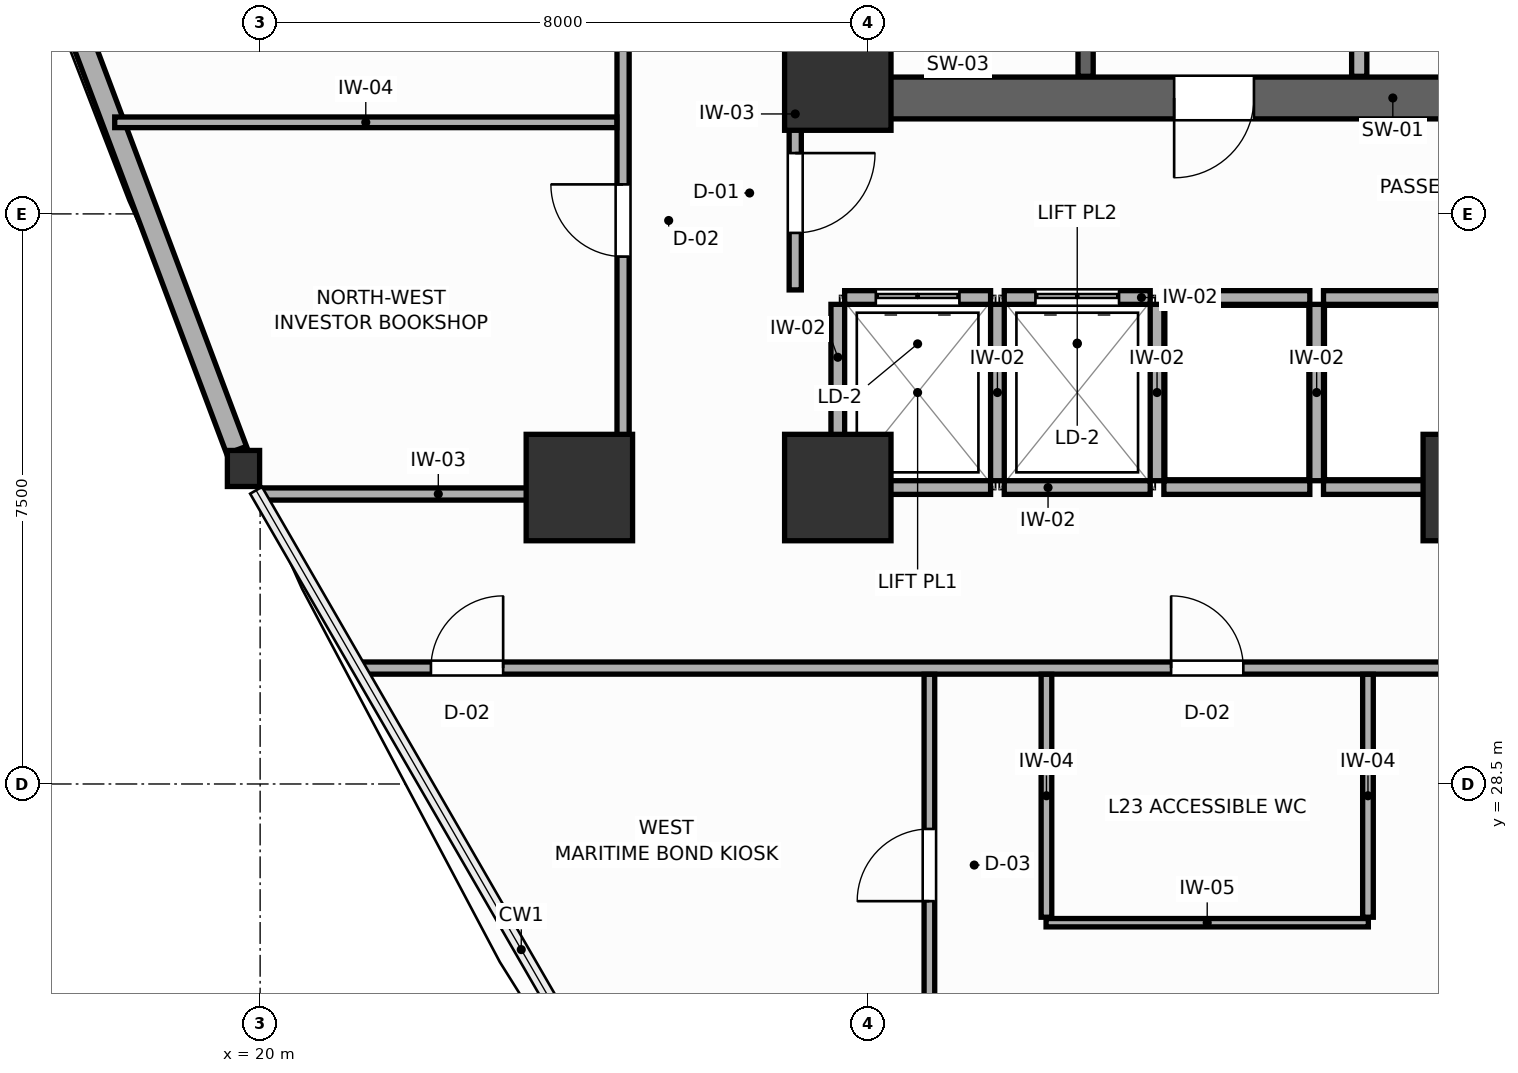
"""IFC4 building model, lengths in metres.
Left out: names, types, materials, properties, quantities, classifications, styles, units other than length and angle.
Written with IfcOpenShell. Run it as: python <this file> out.ifc"""

import sys

from ifc_helpers import new_model, si_unit, direction, frame, frame_2d, origin, origin_2d, place, context, subcontext, project, spatial, rectangle, i_section, extrude, source, transform, mapped, element, fill, save


model = new_model("IFC4")
c1 = context("Model", 3, precision=1e-05, world=origin(), true_north=direction((0.0, 1.0)))
c2 = subcontext(c1, "Body", "Model", "MODEL_VIEW")
j1 = project(units=[si_unit("LENGTHUNIT", "METRE"), si_unit("PLANEANGLEUNIT", "RADIAN")], contexts=[c1])
p1 = place(None, origin())
s1 = spatial("IfcSite", under=j1, at=p1, CompositionType="ELEMENT")
p2 = place(p1, origin())
s2 = spatial("IfcBuilding", under=s1, at=p2, CompositionType="ELEMENT")
p3 = place(p2, frame((0.0, 0.0, 95.1)))
s3 = spatial("IfcBuildingStorey", under=s2, at=p3, CompositionType="ELEMENT", Elevation=95.1)
p4 = place(p3, frame((27.05, 37.525, 0.0), z_axis=(0.0, 0.0, 1.0), x_axis=(1.0, 0.0, 0.0)))
e1 = element("IfcWall", 1, at=p4, inside=s3, PredefinedType="SHEAR", context=c2, shape_type="SweptSolid", body=[
    extrude(rectangle(XDim=17.9, YDim=0.55, at=frame_2d((8.95, 0.0))), origin(), (0.0, 0.0, 1.0), 3.9),
])
p5 = place(p4, frame((4.975, 0.0, 0.0)))
e2 = element("IfcOpeningElement", 2, at=p5, cuts=e1, PredefinedType="OPENING", context=c2, shape_type="SweptSolid", body=[
    extrude(rectangle(XDim=1.05, YDim=2.1, at=frame_2d((0.525, 1.05))), frame((0.0, 0.285, 0.0), z_axis=(0.0, -1.0, 0.0), x_axis=(1.0, 0.0, 0.0)), (0.0, 0.0, 1.0), 0.57),
])
p6 = place(p4, frame((11.875, 0.0, 0.0)))
e3 = element("IfcOpeningElement", 3, at=p6, cuts=e1, PredefinedType="OPENING", context=c2, shape_type="SweptSolid", body=[
    extrude(rectangle(XDim=1.05, YDim=2.1, at=frame_2d((0.525, 1.05))), frame((0.0, 0.285, 0.0), z_axis=(0.0, -1.0, 0.0), x_axis=(1.0, 0.0, 0.0)), (0.0, 0.0, 1.0), 0.57),
])
p7 = place(p3, frame((27.325, 37.8, 0.0), z_axis=(0.0, 0.0, 1.0), x_axis=(0.0, 1.0, 0.0)))
e4 = element("IfcWall", 4, at=p7, inside=s3, PredefinedType="SHEAR", context=c2, shape_type="SweptSolid", body=[
    extrude(rectangle(XDim=9.0, YDim=0.55, at=frame_2d((4.5, 0.0))), origin(), (0.0, 0.0, 1.0), 3.9),
])
m1 = source(origin(), c2, "Body", "SweptSolid", [
    extrude(rectangle(XDim=1.4, YDim=1.4, at=origin_2d()), origin(), (0.0, 0.0, 1.0), 3.9),
])
for number, where, z_axis, x_axis in (
    (5, (27.6, 37.8, 0.0), (0.0, 0.0, 1.0), (1.0, 0.0, 0.0)),
    (6, (27.6, 32.4, 0.0), (0.0, 0.0, 1.0), (1.0, 0.0, 0.0)),
    (7, (36.0, 32.4, 0.0), (0.0, 0.0, 1.0), (1.0, 0.0, 0.0)),
    (8, (24.2, 32.4, 0.0), (0.0, 0.0, 1.0), (1.0, 0.0, 0.0)),
):
    element("IfcColumn", number, at=place(p3, frame(where, z_axis=z_axis, x_axis=x_axis)), inside=s3, PredefinedType="COLUMN", context=c2, shape_type="MappedRepresentation", body=[
        mapped(m1, transform((0.0, 0.0, 0.0), scale=1.0)),
    ])
m2 = source(origin(), c2, "Body", "SweptSolid", [
    extrude(i_section(OverallWidth=0.424, OverallDepth=0.474, WebThickness=0.045, FlangeThickness=0.072, FilletRadius=0.015, at=origin_2d()), origin(), (0.0, 0.0, 1.0), 3.9),
])
p8 = place(p3, frame((19.781, 32.651, 0.0), z_axis=(0.0, 0.0, 1.0), x_axis=(1.0, 0.0, 0.0)))
e9 = element("IfcColumn", 9, at=p8, inside=s3, PredefinedType="COLUMN", context=c2, shape_type="MappedRepresentation", body=[
    mapped(m2, transform((0.0, 0.0, 0.0), scale=1.0)),
])
p9 = place(p3, frame((13.786, 48.577, 0.0), z_axis=(0.0, 0.0, 1.0), x_axis=(0.352279020809, -0.935895021622, 0.0)))
e10 = element("IfcWall", 10, at=p9, inside=s3, PredefinedType="SOLIDWALL", context=c2, shape_type="SweptSolid", body=[
    extrude(rectangle(XDim=16.759, YDim=0.28, at=frame_2d((8.379, 0.0))), origin(), (0.0, 0.0, 1.0), 2.07),
])
p10 = place(p9, frame((7.53, 0.0, 0.75)))
e11 = element("IfcOpeningElement", 11, at=p10, cuts=e10, PredefinedType="OPENING", context=c2, shape_type="SweptSolid", body=[
    extrude(rectangle(XDim=1.7, YDim=1.1, at=frame_2d((0.85, 0.55))), frame((0.0, 0.15, 0.0), z_axis=(0.0, -1.0, 0.0), x_axis=(1.0, 0.0, 0.0)), (0.0, 0.0, 1.0), 0.3),
])
p11 = place(p3, frame((30.86, 37.81, 0.0), z_axis=(0.0, 0.0, 1.0), x_axis=(0.0, 1.0, 0.0)))
e12 = element("IfcWall", 12, at=p11, inside=s3, PredefinedType="SHEAR", context=c2, shape_type="SweptSolid", body=[
    extrude(rectangle(XDim=8.98, YDim=0.2, at=frame_2d((4.49, 0.0))), origin(), (0.0, 0.0, 1.0), 3.9),
])
p12 = place(p11, frame((0.82, 0.0, 0.0)))
e13 = element("IfcOpeningElement", 13, at=p12, cuts=e12, PredefinedType="OPENING", context=c2, shape_type="SweptSolid", body=[
    extrude(rectangle(XDim=1.05, YDim=2.1, at=frame_2d((0.525, 1.05))), frame((0.0, 0.11, 0.0), z_axis=(0.0, -1.0, 0.0), x_axis=(1.0, 0.0, 0.0)), (0.0, 0.0, 1.0), 0.22),
])
p13 = place(p3, frame((34.46, 37.81, 0.0), z_axis=(0.0, 0.0, 1.0), x_axis=(0.0, 1.0, 0.0)))
e14 = element("IfcWall", 14, at=p13, inside=s3, PredefinedType="PARTITIONING", context=c2, shape_type="SweptSolid", body=[
    extrude(rectangle(XDim=8.98, YDim=0.2, at=frame_2d((4.49, 0.0))), origin(), (0.0, 0.0, 1.0), 3.7),
])
p14 = place(p13, frame((0.65, 0.0, 0.0)))
e15 = element("IfcOpeningElement", 15, at=p14, cuts=e14, PredefinedType="OPENING", context=c2, shape_type="SweptSolid", body=[
    extrude(rectangle(XDim=0.85, YDim=2.05, at=frame_2d((0.425, 1.025))), frame((0.0, 0.11, 0.0), z_axis=(0.0, -1.0, 0.0), x_axis=(1.0, 0.0, 0.0)), (0.0, 0.0, 1.0), 0.22),
])
p15 = place(p3, frame((27.69, 34.9, 0.0), z_axis=(0.0, 0.0, 1.0), x_axis=(1.0, 0.0, 0.0)))
e16 = element("IfcWall", 16, at=p15, inside=s3, PredefinedType="PARTITIONING", context=c2, shape_type="SweptSolid", body=[
    extrude(rectangle(XDim=1.92, YDim=0.18, at=frame_2d((0.96, 0.0))), origin(), (0.0, 0.0, 1.0), 3.7),
])
p16 = place(p15, frame((0.41, 0.0, 0.0)))
e17 = element("IfcOpeningElement", 17, at=p16, cuts=e16, PredefinedType="OPENING", context=c2, shape_type="SweptSolid", body=[
    extrude(rectangle(XDim=1.1, YDim=2.1, at=frame_2d((0.55, 1.05))), frame((0.0, 0.1, 0.0), z_axis=(0.0, -1.0, 0.0), x_axis=(1.0, 0.0, 0.0)), (0.0, 0.0, 1.0), 0.2),
])
p17 = place(p3, frame((27.69, 32.4, 0.0), z_axis=(0.0, 0.0, 1.0), x_axis=(1.0, 0.0, 0.0)))
e18 = element("IfcWall", 18, at=p17, inside=s3, PredefinedType="PARTITIONING", context=c2, shape_type="SweptSolid", body=[
    extrude(rectangle(XDim=1.92, YDim=0.18, at=frame_2d((0.96, 0.0))), origin(), (0.0, 0.0, 1.0), 2.23),
])
p18 = place(p3, frame((27.6, 32.49, 0.0), z_axis=(0.0, 0.0, 1.0), x_axis=(0.0, 1.0, 0.0)))
e19 = element("IfcWall", 19, at=p18, inside=s3, PredefinedType="PARTITIONING", context=c2, shape_type="SweptSolid", body=[
    extrude(rectangle(XDim=2.32, YDim=0.18, at=frame_2d((1.16, 0.0))), origin(), (0.0, 0.0, 1.0), 3.7),
])
p19 = place(p3, frame((29.79, 34.9, 0.0), z_axis=(0.0, 0.0, 1.0), x_axis=(1.0, 0.0, 0.0)))
e20 = element("IfcWall", 20, at=p19, inside=s3, PredefinedType="PARTITIONING", context=c2, shape_type="SweptSolid", body=[
    extrude(rectangle(XDim=1.92, YDim=0.18, at=frame_2d((0.96, 0.0))), origin(), (0.0, 0.0, 1.0), 3.7),
])
p20 = place(p19, frame((0.41, 0.0, 0.0)))
e21 = element("IfcOpeningElement", 21, at=p20, cuts=e20, PredefinedType="OPENING", context=c2, shape_type="SweptSolid", body=[
    extrude(rectangle(XDim=1.1, YDim=2.1, at=frame_2d((0.55, 1.05))), frame((0.0, 0.1, 0.0), z_axis=(0.0, -1.0, 0.0), x_axis=(1.0, 0.0, 0.0)), (0.0, 0.0, 1.0), 0.2),
])
p21 = place(p3, frame((29.79, 32.4, 0.0), z_axis=(0.0, 0.0, 1.0), x_axis=(1.0, 0.0, 0.0)))
e22 = element("IfcWall", 22, at=p21, inside=s3, PredefinedType="PARTITIONING", context=c2, shape_type="SweptSolid", body=[
    extrude(rectangle(XDim=1.92, YDim=0.18, at=frame_2d((0.96, 0.0))), origin(), (0.0, 0.0, 1.0), 2.23),
])
p22 = place(p3, frame((29.7, 32.49, 0.0), z_axis=(0.0, 0.0, 1.0), x_axis=(0.0, 1.0, 0.0)))
e23 = element("IfcWall", 23, at=p22, inside=s3, PredefinedType="PARTITIONING", context=c2, shape_type="SweptSolid", body=[
    extrude(rectangle(XDim=2.32, YDim=0.18, at=frame_2d((1.16, 0.0))), origin(), (0.0, 0.0, 1.0), 3.7),
])
p23 = place(p3, frame((31.89, 34.9, 0.0), z_axis=(0.0, 0.0, 1.0), x_axis=(1.0, 0.0, 0.0)))
e24 = element("IfcWall", 24, at=p23, inside=s3, PredefinedType="PARTITIONING", context=c2, shape_type="SweptSolid", body=[
    extrude(rectangle(XDim=1.92, YDim=0.18, at=frame_2d((0.96, 0.0))), origin(), (0.0, 0.0, 1.0), 3.7),
])
p24 = place(p3, frame((31.89, 32.4, 0.0), z_axis=(0.0, 0.0, 1.0), x_axis=(1.0, 0.0, 0.0)))
e25 = element("IfcWall", 25, at=p24, inside=s3, PredefinedType="PARTITIONING", context=c2, shape_type="SweptSolid", body=[
    extrude(rectangle(XDim=1.92, YDim=0.18, at=frame_2d((0.96, 0.0))), origin(), (0.0, 0.0, 1.0), 2.23),
])
p25 = place(p3, frame((31.8, 32.49, 0.0), z_axis=(0.0, 0.0, 1.0), x_axis=(0.0, 1.0, 0.0)))
e26 = element("IfcWall", 26, at=p25, inside=s3, PredefinedType="PARTITIONING", context=c2, shape_type="SweptSolid", body=[
    extrude(rectangle(XDim=2.32, YDim=0.18, at=frame_2d((1.16, 0.0))), origin(), (0.0, 0.0, 1.0), 3.7),
])
p26 = place(p3, frame((33.99, 34.9, 0.0), z_axis=(0.0, 0.0, 1.0), x_axis=(1.0, 0.0, 0.0)))
e27 = element("IfcWall", 27, at=p26, inside=s3, PredefinedType="PARTITIONING", context=c2, shape_type="SweptSolid", body=[
    extrude(rectangle(XDim=1.92, YDim=0.18, at=frame_2d((0.96, 0.0))), origin(), (0.0, 0.0, 1.0), 3.7),
])
p27 = place(p3, frame((33.99, 32.4, 0.0), z_axis=(0.0, 0.0, 1.0), x_axis=(1.0, 0.0, 0.0)))
e28 = element("IfcWall", 28, at=p27, inside=s3, PredefinedType="PARTITIONING", context=c2, shape_type="SweptSolid", body=[
    extrude(rectangle(XDim=1.92, YDim=0.18, at=frame_2d((0.96, 0.0))), origin(), (0.0, 0.0, 1.0), 2.23),
])
p28 = place(p3, frame((33.9, 32.49, 0.0), z_axis=(0.0, 0.0, 1.0), x_axis=(0.0, 1.0, 0.0)))
e29 = element("IfcWall", 29, at=p28, inside=s3, PredefinedType="PARTITIONING", context=c2, shape_type="SweptSolid", body=[
    extrude(rectangle(XDim=2.32, YDim=0.18, at=frame_2d((1.16, 0.0))), origin(), (0.0, 0.0, 1.0), 3.7),
])
p29 = place(p3, frame((27.04, 35.0, 0.0), z_axis=(0.0, 0.0, 1.0), x_axis=(0.0, 1.0, 0.0)))
e30 = element("IfcWall", 30, at=p29, inside=s3, PredefinedType="PARTITIONING", context=c2, shape_type="SweptSolid", body=[
    extrude(rectangle(XDim=2.65, YDim=0.16, at=frame_2d((1.325, 0.0))), origin(), (0.0, 0.0, 1.0), 3.7),
])
p30 = place(p29, frame((0.75, 0.0, 0.0)))
e31 = element("IfcOpeningElement", 31, at=p30, cuts=e30, PredefinedType="OPENING", context=c2, shape_type="SweptSolid", body=[
    extrude(rectangle(XDim=1.05, YDim=2.1, at=frame_2d((0.525, 1.05))), frame((0.0, 0.09, 0.0), z_axis=(0.0, -1.0, 0.0), x_axis=(1.0, 0.0, 0.0)), (0.0, 0.0, 1.0), 0.18),
])
p31 = place(p3, frame((21.317, 30.025, 0.0), z_axis=(0.0, 0.0, 1.0), x_axis=(1.0, 0.0, 0.0)))
e32 = element("IfcWall", 32, at=p31, inside=s3, PredefinedType="PARTITIONING", context=c2, shape_type="SweptSolid", body=[
    extrude(rectangle(XDim=37.766, YDim=0.16, at=frame_2d((18.883, 0.0))), origin(), (0.0, 0.0, 1.0), 3.7),
])
p32 = place(p31, frame((10.668, 0.0, 0.0)))
e33 = element("IfcOpeningElement", 33, at=p32, cuts=e32, PredefinedType="OPENING", context=c2, shape_type="SweptSolid", body=[
    extrude(rectangle(XDim=0.95, YDim=2.05, at=frame_2d((0.475, 1.025))), frame((0.0, 0.09, 0.0), z_axis=(0.0, -1.0, 0.0), x_axis=(1.0, 0.0, 0.0)), (0.0, 0.0, 1.0), 0.18),
])
p33 = place(p31, frame((0.93, 0.0, 0.0)))
e34 = element("IfcOpeningElement", 34, at=p33, cuts=e32, PredefinedType="OPENING", context=c2, shape_type="SweptSolid", body=[
    extrude(rectangle(XDim=0.95, YDim=2.05, at=frame_2d((0.475, 1.025))), frame((0.0, 0.09, 0.0), z_axis=(0.0, -1.0, 0.0), x_axis=(1.0, 0.0, 0.0)), (0.0, 0.0, 1.0), 0.18),
])
p34 = place(p3, frame((24.775, 32.31, 0.0), z_axis=(0.0, 0.0, 1.0), x_axis=(0.0, 1.0, 0.0)))
e35 = element("IfcWall", 35, at=p34, inside=s3, PredefinedType="PARTITIONING", context=c2, shape_type="SweptSolid", body=[
    extrude(rectangle(XDim=21.688, YDim=0.16, at=frame_2d((10.844, 0.0))), origin(), (0.0, 0.0, 1.0), 3.7),
])
p35 = place(p34, frame((3.128, 0.0, 0.0)))
e36 = element("IfcOpeningElement", 36, at=p35, cuts=e35, PredefinedType="OPENING", context=c2, shape_type="SweptSolid", body=[
    extrude(rectangle(XDim=0.95, YDim=2.05, at=frame_2d((0.475, 1.025))), frame((0.0, 0.09, 0.0), z_axis=(0.0, -1.0, 0.0), x_axis=(1.0, 0.0, 0.0)), (0.0, 0.0, 1.0), 0.18),
])
p36 = place(p34, frame((11.573, 0.0, 0.0)))
e37 = element("IfcOpeningElement", 37, at=p36, cuts=e35, PredefinedType="OPENING", context=c2, shape_type="SweptSolid", body=[
    extrude(rectangle(XDim=0.95, YDim=2.05, at=frame_2d((0.475, 1.025))), frame((0.0, 0.09, 0.0), z_axis=(0.0, -1.0, 0.0), x_axis=(1.0, 0.0, 0.0)), (0.0, 0.0, 1.0), 0.18),
])
p37 = place(p3, frame((19.995, 32.315, 0.0), z_axis=(0.0, 0.0, 1.0), x_axis=(1.0, 0.0, 0.0)))
e38 = element("IfcWall", 38, at=p37, inside=s3, PredefinedType="PARTITIONING", context=c2, shape_type="SweptSolid", body=[
    extrude(rectangle(XDim=4.698, YDim=0.16, at=frame_2d((2.349, 0.0))), origin(), (0.0, 0.0, 1.0), 2.23),
])
p38 = place(p3, frame((28.805, 17.921, 0.0), z_axis=(0.0, 0.0, 1.0), x_axis=(0.0, 1.0, 0.0)))
e39 = element("IfcWall", 39, at=p38, inside=s3, PredefinedType="PARTITIONING", context=c2, shape_type="SweptSolid", body=[
    extrude(rectangle(XDim=12.022, YDim=0.14, at=frame_2d((6.011, 0.0))), origin(), (0.0, 0.0, 1.0), 3.7),
])
p39 = place(p38, frame((9.037, 0.0, 0.0)))
e40 = element("IfcOpeningElement", 40, at=p39, cuts=e39, PredefinedType="OPENING", context=c2, shape_type="SweptSolid", body=[
    extrude(rectangle(XDim=0.95, YDim=2.05, at=frame_2d((0.475, 1.025))), frame((0.0, 0.08, 0.0), z_axis=(0.0, -1.0, 0.0), x_axis=(1.0, 0.0, 0.0)), (0.0, 0.0, 1.0), 0.16),
])
p40 = place(p3, frame((18.087, 37.205, 0.0), z_axis=(0.0, 0.0, 1.0), x_axis=(1.0, 0.0, 0.0)))
e41 = element("IfcWall", 41, at=p40, inside=s3, PredefinedType="PARTITIONING", context=c2, shape_type="SweptSolid", body=[
    extrude(rectangle(XDim=6.606, YDim=0.14, at=frame_2d((3.303, 0.0))), origin(), (0.0, 0.0, 1.0), 3.7),
])
p41 = place(p3, frame((30.34, 26.675, 0.0), z_axis=(0.0, 0.0, 1.0), x_axis=(1.0, 0.0, 0.0)))
e42 = element("IfcWall", 42, at=p41, inside=s3, PredefinedType="MOVABLE", context=c2, shape_type="SweptSolid", body=[
    extrude(rectangle(XDim=4.24, YDim=0.11, at=frame_2d((2.12, 0.0))), origin(), (0.0, 0.0, 1.0), 3.7),
])
for number, where, z_axis, x_axis in (
    (43, (34.575, 26.747, 0.0), (0.0, 0.0, 1.0), (0.0, 1.0, 0.0)),
    (44, (30.345, 26.747, 0.0), (0.0, 0.0, 1.0), (0.0, 1.0, 0.0)),
):
    element("IfcWall", number, at=place(p3, frame(where, z_axis=z_axis, x_axis=x_axis)), inside=s3, PredefinedType="PARTITIONING", context=c2, shape_type="SweptSolid", body=[
        extrude(rectangle(XDim=3.196, YDim=0.14, at=frame_2d((1.598, 0.0))), origin(), (0.0, 0.0, 1.0), 3.7),
    ])
p42 = place(p16, origin())
e45 = element("IfcDoor", 45, at=p42, inside=s3, OperationType="DOUBLE_DOOR_SLIDING", PredefinedType="DOOR", context=c2, shape_type="SweptSolid", body=[
    extrude(rectangle(XDim=1.1, YDim=2.1, at=frame_2d((0.55, 1.05))), frame((0.0, 0.025, 0.0), z_axis=(0.0, -1.0, 0.0), x_axis=(1.0, 0.0, 0.0)), (0.0, 0.0, 1.0), 0.05),
])
fill(e17, e45)
p43 = place(p20, origin())
e46 = element("IfcDoor", 46, at=p43, inside=s3, OperationType="DOUBLE_DOOR_SLIDING", PredefinedType="DOOR", context=c2, shape_type="SweptSolid", body=[
    extrude(rectangle(XDim=1.1, YDim=2.1, at=frame_2d((0.55, 1.05))), frame((0.0, 0.025, 0.0), z_axis=(0.0, -1.0, 0.0), x_axis=(1.0, 0.0, 0.0)), (0.0, 0.0, 1.0), 0.05),
])
fill(e21, e46)
p44 = place(p30, frame((1.05, 0.0, 0.0), z_axis=(0.0, 0.0, 1.0), x_axis=(-1.0, 0.0, 0.0)))
e47 = element("IfcDoor", 47, at=p44, inside=s3, OperationType="SINGLE_SWING_LEFT", PredefinedType="DOOR", context=c2, shape_type="SweptSolid", body=[
    extrude(rectangle(XDim=1.05, YDim=2.1, at=frame_2d((0.525, 1.05))), frame((0.0, 0.025, 0.0), z_axis=(0.0, -1.0, 0.0), x_axis=(1.0, 0.0, 0.0)), (0.0, 0.0, 1.0), 0.05),
])
fill(e31, e47)
p45 = place(p32, origin())
e48 = element("IfcDoor", 48, at=p45, inside=s3, OperationType="SINGLE_SWING_LEFT", PredefinedType="DOOR", context=c2, shape_type="SweptSolid", body=[
    extrude(rectangle(XDim=0.95, YDim=2.05, at=frame_2d((0.475, 1.025))), frame((0.0, 0.025, 0.0), z_axis=(0.0, -1.0, 0.0), x_axis=(1.0, 0.0, 0.0)), (0.0, 0.0, 1.0), 0.05),
])
fill(e33, e48)
p46 = place(p33, origin())
e49 = element("IfcDoor", 49, at=p46, inside=s3, OperationType="SINGLE_SWING_RIGHT", PredefinedType="DOOR", context=c2, shape_type="SweptSolid", body=[
    extrude(rectangle(XDim=0.95, YDim=2.05, at=frame_2d((0.475, 1.025))), frame((0.0, 0.025, 0.0), z_axis=(0.0, -1.0, 0.0), x_axis=(1.0, 0.0, 0.0)), (0.0, 0.0, 1.0), 0.05),
])
fill(e34, e49)
p47 = place(p35, origin())
e50 = element("IfcDoor", 50, at=p47, inside=s3, OperationType="SINGLE_SWING_RIGHT", PredefinedType="DOOR", context=c2, shape_type="SweptSolid", body=[
    extrude(rectangle(XDim=0.95, YDim=2.05, at=frame_2d((0.475, 1.025))), frame((0.0, 0.025, 0.0), z_axis=(0.0, -1.0, 0.0), x_axis=(1.0, 0.0, 0.0)), (0.0, 0.0, 1.0), 0.05),
])
fill(e36, e50)
p48 = place(p39, origin())
e51 = element("IfcDoor", 51, at=p48, inside=s3, OperationType="SINGLE_SWING_LEFT", PredefinedType="DOOR", context=c2, shape_type="SweptSolid", body=[
    extrude(rectangle(XDim=0.95, YDim=2.05, at=frame_2d((0.475, 1.025))), frame((0.0, 0.025, 0.0), z_axis=(0.0, -1.0, 0.0), x_axis=(1.0, 0.0, 0.0)), (0.0, 0.0, 1.0), 0.05),
])
fill(e40, e51)
p49 = place(p5, frame((1.05, 0.0, 0.0), z_axis=(0.0, 0.0, 1.0), x_axis=(-1.0, 0.0, 0.0)))
e52 = element("IfcDoor", 52, at=p49, inside=s3, OperationType="SINGLE_SWING_RIGHT", PredefinedType="DOOR", context=c2, shape_type="SweptSolid", body=[
    extrude(rectangle(XDim=1.05, YDim=2.1, at=frame_2d((0.525, 1.05))), frame((0.0, 0.025, 0.0), z_axis=(0.0, -1.0, 0.0), x_axis=(1.0, 0.0, 0.0)), (0.0, 0.0, 1.0), 0.05),
])
fill(e2, e52)
save(model, sys.argv[1])
